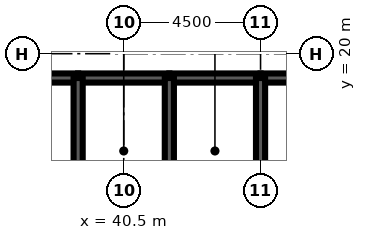
"""IFC4 building model, lengths in metres.
Left out: names, types, materials, properties, quantities, classifications, styles, units other than length and angle.
Written with IfcOpenShell. Run it as: python <this file> out.ifc"""

import sys

from ifc_helpers import new_model, si_unit, direction, frame, frame_2d, origin, place, context, subcontext, project, spatial, rectangle, extrude, element, fill, save


model = new_model("IFC4")
c1 = context("Model", 3, precision=1e-05, world=origin(), true_north=direction((0.0, 1.0)))
c2 = subcontext(c1, "Body", "Model", "MODEL_VIEW")
j1 = project(units=[si_unit("LENGTHUNIT", "METRE"), si_unit("PLANEANGLEUNIT", "RADIAN")], contexts=[c1])
p1 = place(None, origin())
s1 = spatial("IfcSite", under=j1, at=p1, CompositionType="ELEMENT")
p2 = place(p1, origin())
s2 = spatial("IfcBuilding", under=s1, at=p2, CompositionType="ELEMENT")
p3 = place(p2, frame((0.0, 0.0, 194.2)))
s3 = spatial("IfcBuildingStorey", under=s2, at=p3, CompositionType="ELEMENT", Elevation=194.2)
p4 = place(p3, frame((36.0, 19.2, 0.0), z_axis=(0.0, 0.0, 1.0), x_axis=(1.0, 0.0, 0.0)))
e1 = element("IfcWall", 1, at=p4, inside=s3, PredefinedType="SOLIDWALL", context=c2, shape_type="SweptSolid", body=[
    extrude(rectangle(XDim=3.0, YDim=0.3, at=frame_2d((1.5, 0.0))), origin(), (0.0, 0.0, 1.0), 4.2),
])
p5 = place(p4, frame((0.95, 0.0, 0.0)))
e2 = element("IfcOpeningElement", 2, at=p5, cuts=e1, PredefinedType="OPENING", context=c2, shape_type="SweptSolid", body=[
    extrude(rectangle(XDim=1.1, YDim=2.2, at=frame_2d((0.55, 1.1))), frame((0.0, 0.16, 0.0), z_axis=(0.0, -1.0, 0.0), x_axis=(1.0, 0.0, 0.0)), (0.0, 0.0, 1.0), 0.32),
])
p6 = place(p3, frame((39.0, 19.2, 0.0), z_axis=(0.0, 0.0, 1.0), x_axis=(1.0, 0.0, 0.0)))
e3 = element("IfcWall", 3, at=p6, inside=s3, PredefinedType="SOLIDWALL", context=c2, shape_type="SweptSolid", body=[
    extrude(rectangle(XDim=3.0, YDim=0.3, at=frame_2d((1.5, 0.0))), origin(), (0.0, 0.0, 1.0), 4.2),
])
p7 = place(p6, frame((1.0, 0.0, 0.0)))
e4 = element("IfcOpeningElement", 4, at=p7, cuts=e3, PredefinedType="OPENING", context=c2, shape_type="SweptSolid", body=[
    extrude(rectangle(XDim=1.0, YDim=2.1, at=frame_2d((0.5, 1.05))), frame((0.0, 0.16, 0.0), z_axis=(0.0, -1.0, 0.0), x_axis=(1.0, 0.0, 0.0)), (0.0, 0.0, 1.0), 0.32),
])
p8 = place(p3, frame((42.0, 19.2, 0.0), z_axis=(0.0, 0.0, 1.0), x_axis=(1.0, 0.0, 0.0)))
e5 = element("IfcWall", 5, at=p8, inside=s3, PredefinedType="SOLIDWALL", context=c2, shape_type="SweptSolid", body=[
    extrude(rectangle(XDim=3.0, YDim=0.3, at=frame_2d((1.5, 0.0))), origin(), (0.0, 0.0, 1.0), 4.2),
])
p9 = place(p8, frame((1.0, 0.0, 0.0)))
e6 = element("IfcOpeningElement", 6, at=p9, cuts=e5, PredefinedType="OPENING", context=c2, shape_type="SweptSolid", body=[
    extrude(rectangle(XDim=1.0, YDim=2.1, at=frame_2d((0.5, 1.05))), frame((0.0, 0.16, 0.0), z_axis=(0.0, -1.0, 0.0), x_axis=(1.0, 0.0, 0.0)), (0.0, 0.0, 1.0), 0.32),
])
p10 = place(p3, frame((45.0, 19.2, 0.0), z_axis=(0.0, 0.0, 1.0), x_axis=(1.0, 0.0, 0.0)))
e7 = element("IfcWall", 7, at=p10, inside=s3, PredefinedType="SOLIDWALL", context=c2, shape_type="SweptSolid", body=[
    extrude(rectangle(XDim=9.0, YDim=0.3, at=frame_2d((4.5, 0.0))), origin(), (0.0, 0.0, 1.0), 4.2),
])
p11 = place(p10, frame((7.35, 0.0, 0.0)))
e8 = element("IfcOpeningElement", 8, at=p11, cuts=e7, PredefinedType="OPENING", context=c2, shape_type="SweptSolid", body=[
    extrude(rectangle(XDim=1.0, YDim=2.1, at=frame_2d((0.5, 1.05))), frame((0.0, 0.16, 0.0), z_axis=(0.0, -1.0, 0.0), x_axis=(1.0, 0.0, 0.0)), (0.0, 0.0, 1.0), 0.32),
])
for number, where, z_axis, x_axis in (
    (9, (39.0, 16.0, 0.0), (0.0, 0.0, 1.0), (0.0, 1.0, 0.0)),
    (10, (42.0, 16.0, 0.0), (0.0, 0.0, 1.0), (0.0, 1.0, 0.0)),
    (11, (45.0, 16.0, 0.0), (0.0, 0.0, 1.0), (0.0, 1.0, 0.0)),
):
    element("IfcWall", number, at=place(p3, frame(where, z_axis=z_axis, x_axis=x_axis)), inside=s3, PredefinedType="SOLIDWALL", context=c2, shape_type="SweptSolid", body=[
        extrude(rectangle(XDim=3.2, YDim=0.3, at=frame_2d((1.6, 0.0))), origin(), (0.0, 0.0, 1.0), 4.2),
    ])
p12 = place(p3, frame((39.15, 17.35, 0.0), z_axis=(0.0, 0.0, 1.0), x_axis=(1.0, 0.0, 0.0)))
e12 = element("IfcWall", 12, at=p12, inside=s3, PredefinedType="SOLIDWALL", context=c2, shape_type="SweptSolid", body=[
    extrude(rectangle(XDim=2.7, YDim=0.3, at=frame_2d((1.35, 0.0))), origin(), (0.0, 0.0, 1.0), 4.04),
])
p13 = place(p12, frame((0.85, 0.0, 0.0)))
e13 = element("IfcOpeningElement", 13, at=p13, cuts=e12, PredefinedType="OPENING", context=c2, shape_type="SweptSolid", body=[
    extrude(rectangle(XDim=1.0, YDim=2.1, at=frame_2d((0.5, 1.05))), frame((0.0, 0.16, 0.0), z_axis=(0.0, -1.0, 0.0), x_axis=(1.0, 0.0, 0.0)), (0.0, 0.0, 1.0), 0.32),
])
p14 = place(p3, frame((42.15, 17.35, 0.0), z_axis=(0.0, 0.0, 1.0), x_axis=(1.0, 0.0, 0.0)))
e14 = element("IfcWall", 14, at=p14, inside=s3, PredefinedType="SOLIDWALL", context=c2, shape_type="SweptSolid", body=[
    extrude(rectangle(XDim=2.7, YDim=0.3, at=frame_2d((1.35, 0.0))), origin(), (0.0, 0.0, 1.0), 4.04),
])
p15 = place(p14, frame((0.85, 0.0, 0.0)))
e15 = element("IfcOpeningElement", 15, at=p15, cuts=e14, PredefinedType="OPENING", context=c2, shape_type="SweptSolid", body=[
    extrude(rectangle(XDim=1.0, YDim=2.1, at=frame_2d((0.5, 1.05))), frame((0.0, 0.16, 0.0), z_axis=(0.0, -1.0, 0.0), x_axis=(1.0, 0.0, 0.0)), (0.0, 0.0, 1.0), 0.32),
])
p16 = place(p13, origin())
e16 = element("IfcDoor", 16, at=p16, inside=s3, OperationType="SINGLE_SWING_LEFT", PredefinedType="DOOR", context=c2, shape_type="SweptSolid", body=[
    extrude(rectangle(XDim=1.0, YDim=2.1, at=frame_2d((0.5, 1.05))), frame((0.0, 0.025, 0.0), z_axis=(0.0, -1.0, 0.0), x_axis=(1.0, 0.0, 0.0)), (0.0, 0.0, 1.0), 0.05),
])
fill(e13, e16)
p17 = place(p15, origin())
e17 = element("IfcDoor", 17, at=p17, inside=s3, OperationType="SINGLE_SWING_LEFT", PredefinedType="DOOR", context=c2, shape_type="SweptSolid", body=[
    extrude(rectangle(XDim=1.0, YDim=2.1, at=frame_2d((0.5, 1.05))), frame((0.0, 0.025, 0.0), z_axis=(0.0, -1.0, 0.0), x_axis=(1.0, 0.0, 0.0)), (0.0, 0.0, 1.0), 0.05),
])
fill(e15, e17)
p18 = place(p7, origin())
e18 = element("IfcDoor", 18, at=p18, inside=s3, OperationType="SINGLE_SWING_LEFT", PredefinedType="DOOR", context=c2, shape_type="SweptSolid", body=[
    extrude(rectangle(XDim=1.0, YDim=2.1, at=frame_2d((0.5, 1.05))), frame((0.0, 0.025, 0.0), z_axis=(0.0, -1.0, 0.0), x_axis=(1.0, 0.0, 0.0)), (0.0, 0.0, 1.0), 0.05),
])
fill(e4, e18)
p19 = place(p9, origin())
e19 = element("IfcDoor", 19, at=p19, inside=s3, OperationType="SINGLE_SWING_LEFT", PredefinedType="DOOR", context=c2, shape_type="SweptSolid", body=[
    extrude(rectangle(XDim=1.0, YDim=2.1, at=frame_2d((0.5, 1.05))), frame((0.0, 0.025, 0.0), z_axis=(0.0, -1.0, 0.0), x_axis=(1.0, 0.0, 0.0)), (0.0, 0.0, 1.0), 0.05),
])
fill(e6, e19)
save(model, sys.argv[1])
